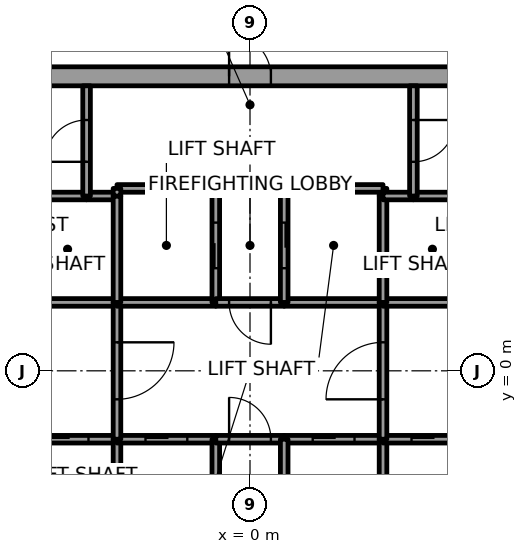
"""IFC4 building model, lengths in metres.
Left out: names, types, materials, properties, quantities, classifications, styles, units other than length and angle.
Written with IfcOpenShell. Run it as: python <this file> out.ifc"""

import sys

from ifc_helpers import new_model, si_unit, direction, frame, frame_2d, origin, place, context, subcontext, project, spatial, rectangle, extrude, element, fill, save


model = new_model("IFC4")
c1 = context("Model", 3, precision=1e-05, world=origin(), true_north=direction((0.0, 1.0)))
c2 = subcontext(c1, "Body", "Model", "MODEL_VIEW")
j1 = project(units=[si_unit("LENGTHUNIT", "METRE"), si_unit("PLANEANGLEUNIT", "RADIAN")], contexts=[c1])
p1 = place(None, origin())
s1 = spatial("IfcSite", under=j1, at=p1, CompositionType="ELEMENT")
p2 = place(p1, origin())
s2 = spatial("IfcBuilding", under=s1, at=p2, CompositionType="ELEMENT")
p3 = place(p2, frame((0.0, 0.0, 169.8)))
s3 = spatial("IfcBuildingStorey", under=s2, at=p3, CompositionType="ELEMENT", Elevation=169.8)
p4 = place(p3, frame((-11.0, 7.75, 0.0), z_axis=(0.0, 0.0, 1.0), x_axis=(1.0, 0.0, 0.0)))
e1 = element("IfcWall", 1, at=p4, inside=s3, PredefinedType="SHEAR", context=c2, shape_type="SweptSolid", body=[
    extrude(rectangle(XDim=22.0, YDim=0.5, at=frame_2d((11.0, 0.0))), origin(), (0.0, 0.0, 1.0), 4.0),
])
p5 = place(p4, frame((10.45, 0.0, 0.0)))
e2 = element("IfcOpeningElement", 2, at=p5, cuts=e1, PredefinedType="OPENING", context=c2, shape_type="SweptSolid", body=[
    extrude(rectangle(XDim=1.1, YDim=2.1, at=frame_2d((0.55, 1.05))), frame((0.0, 0.25, 0.0), z_axis=(0.0, -1.0, 0.0), x_axis=(1.0, 0.0, 0.0)), (0.0, 0.0, 1.0), 0.5),
])
p6 = place(p3, frame((-6.1, -1.8, 0.0), z_axis=(0.0, 0.0, 1.0), x_axis=(1.0, 0.0, 0.0)))
e3 = element("IfcWall", 3, at=p6, inside=s3, PredefinedType="SOLIDWALL", context=c2, shape_type="SweptSolid", body=[
    extrude(rectangle(XDim=2.6, YDim=0.2, at=frame_2d((1.3, 0.0))), origin(), (0.0, 0.0, 1.0), 3.85),
])
p7 = place(p6, frame((0.75, 0.0, 0.0)))
e4 = element("IfcOpeningElement", 4, at=p7, cuts=e3, PredefinedType="OPENING", context=c2, shape_type="SweptSolid", body=[
    extrude(rectangle(XDim=1.1, YDim=2.1, at=frame_2d((0.55, 1.05))), frame((0.0, 0.1, 0.0), z_axis=(0.0, -1.0, 0.0), x_axis=(1.0, 0.0, 0.0)), (0.0, 0.0, 1.0), 0.2),
])
p8 = place(p3, frame((-3.5, 1.8, 0.0), z_axis=(0.0, 0.0, 1.0), x_axis=(-1.0, 0.0, 0.0)))
e5 = element("IfcWall", 5, at=p8, inside=s3, PredefinedType="SOLIDWALL", context=c2, shape_type="SweptSolid", body=[
    extrude(rectangle(XDim=2.6, YDim=0.2, at=frame_2d((1.3, 0.0))), origin(), (0.0, 0.0, 1.0), 3.85),
])
p9 = place(p3, frame((-4.3, 4.6, 0.0), z_axis=(0.0, 0.0, 1.0), x_axis=(-1.0, 0.0, 0.0)))
e6 = element("IfcWall", 6, at=p9, inside=s3, PredefinedType="SOLIDWALL", context=c2, shape_type="SweptSolid", body=[
    extrude(rectangle(XDim=1.8, YDim=0.2, at=frame_2d((0.9, 0.0))), origin(), (0.0, 0.0, 1.0), 3.85),
])
p10 = place(p3, frame((-3.5, 4.6, 0.0), z_axis=(0.0, 0.0, 1.0), x_axis=(-1.0, 0.0, 0.0)))
e7 = element("IfcWall", 7, at=p10, inside=s3, PredefinedType="SOLIDWALL", context=c2, shape_type="SweptSolid", body=[
    extrude(rectangle(XDim=0.8, YDim=0.2, at=frame_2d((0.4, 0.0))), origin(), (0.0, 0.0, 1.0), 3.85),
])
p11 = place(p3, frame((-4.3, 4.6, 0.0), z_axis=(0.0, 0.0, 1.0), x_axis=(0.0, 1.0, 0.0)))
e8 = element("IfcWall", 8, at=p11, inside=s3, PredefinedType="SOLIDWALL", context=c2, shape_type="SweptSolid", body=[
    extrude(rectangle(XDim=2.9, YDim=0.2, at=frame_2d((1.45, 0.0))), origin(), (0.0, 0.0, 1.0), 3.85),
])
p12 = place(p11, frame((0.9, 0.0, 0.0)))
e9 = element("IfcOpeningElement", 9, at=p12, cuts=e8, PredefinedType="OPENING", context=c2, shape_type="SweptSolid", body=[
    extrude(rectangle(XDim=1.1, YDim=2.1, at=frame_2d((0.55, 1.05))), frame((0.0, 0.1, 0.0), z_axis=(0.0, -1.0, 0.0), x_axis=(1.0, 0.0, 0.0)), (0.0, 0.0, 1.0), 0.2),
])
p13 = place(p3, frame((-3.5, -4.6, 0.0), z_axis=(0.0, 0.0, 1.0), x_axis=(0.0, 1.0, 0.0)))
e10 = element("IfcWall", 10, at=p13, inside=s3, PredefinedType="SOLIDWALL", context=c2, shape_type="SweptSolid", body=[
    extrude(rectangle(XDim=2.8, YDim=0.2, at=frame_2d((1.4, 0.0))), origin(), (0.0, 0.0, 1.0), 3.85),
])
p14 = place(p3, frame((-3.5, -1.8, 0.0), z_axis=(0.0, 0.0, 1.0), x_axis=(1.0, 0.0, 0.0)))
e11 = element("IfcWall", 11, at=p14, inside=s3, PredefinedType="SOLIDWALL", context=c2, shape_type="SweptSolid", body=[
    extrude(rectangle(XDim=2.6, YDim=0.2, at=frame_2d((1.3, 0.0))), origin(), (0.0, 0.0, 1.0), 3.85),
])
p15 = place(p14, frame((0.75, 0.0, 0.0)))
e12 = element("IfcOpeningElement", 12, at=p15, cuts=e11, PredefinedType="OPENING", context=c2, shape_type="SweptSolid", body=[
    extrude(rectangle(XDim=1.1, YDim=2.1, at=frame_2d((0.55, 1.05))), frame((0.0, 0.1, 0.0), z_axis=(0.0, -1.0, 0.0), x_axis=(1.0, 0.0, 0.0)), (0.0, 0.0, 1.0), 0.2),
])
p16 = place(p3, frame((-3.5, 1.8, 0.0), z_axis=(0.0, 0.0, 1.0), x_axis=(0.0, -1.0, 0.0)))
e13 = element("IfcWall", 13, at=p16, inside=s3, PredefinedType="SOLIDWALL", context=c2, shape_type="SweptSolid", body=[
    extrude(rectangle(XDim=3.6, YDim=0.2, at=frame_2d((1.8, 0.0))), origin(), (0.0, 0.0, 1.0), 3.85),
])
p17 = place(p16, frame((1.05, 0.0, 0.0)))
e14 = element("IfcOpeningElement", 14, at=p17, cuts=e13, PredefinedType="OPENING", context=c2, shape_type="SweptSolid", body=[
    extrude(rectangle(XDim=1.5, YDim=2.1, at=frame_2d((0.75, 1.05))), frame((0.0, 0.1, 0.0), z_axis=(0.0, -1.0, 0.0), x_axis=(1.0, 0.0, 0.0)), (0.0, 0.0, 1.0), 0.2),
])
p18 = place(p3, frame((-0.9, 1.8, 0.0), z_axis=(0.0, 0.0, 1.0), x_axis=(-1.0, 0.0, 0.0)))
e15 = element("IfcWall", 15, at=p18, inside=s3, PredefinedType="SOLIDWALL", context=c2, shape_type="SweptSolid", body=[
    extrude(rectangle(XDim=2.6, YDim=0.2, at=frame_2d((1.3, 0.0))), origin(), (0.0, 0.0, 1.0), 3.85),
])
p19 = place(p3, frame((-3.5, 4.6, 0.0), z_axis=(0.0, 0.0, 1.0), x_axis=(0.0, -1.0, 0.0)))
e16 = element("IfcWall", 16, at=p19, inside=s3, PredefinedType="SOLIDWALL", context=c2, shape_type="SweptSolid", body=[
    extrude(rectangle(XDim=2.8, YDim=0.2, at=frame_2d((1.4, 0.0))), origin(), (0.0, 0.0, 1.0), 3.85),
])
p20 = place(p3, frame((-0.9, 1.8, 0.0), z_axis=(0.0, 0.0, 1.0), x_axis=(0.0, 1.0, 0.0)))
e17 = element("IfcWall", 17, at=p20, inside=s3, PredefinedType="SOLIDWALL", context=c2, shape_type="SweptSolid", body=[
    extrude(rectangle(XDim=3.0, YDim=0.2, at=frame_2d((1.5, 0.0))), origin(), (0.0, 0.0, 1.0), 3.85),
])
p21 = place(p20, frame((0.9, 0.0, 0.0)))
e18 = element("IfcOpeningElement", 18, at=p21, cuts=e17, PredefinedType="OPENING", context=c2, shape_type="SweptSolid", body=[
    extrude(rectangle(XDim=1.2, YDim=2.1, at=frame_2d((0.6, 1.05))), frame((0.0, 0.1, 0.0), z_axis=(0.0, -1.0, 0.0), x_axis=(1.0, 0.0, 0.0)), (0.0, 0.0, 1.0), 0.2),
])
p22 = place(p3, frame((-0.9, 4.8, 0.0), z_axis=(0.0, 0.0, 1.0), x_axis=(-1.0, 0.0, 0.0)))
e19 = element("IfcWall", 19, at=p22, inside=s3, PredefinedType="SOLIDWALL", context=c2, shape_type="SweptSolid", body=[
    extrude(rectangle(XDim=2.6, YDim=0.2, at=frame_2d((1.3, 0.0))), origin(), (0.0, 0.0, 1.0), 3.85),
])
p23 = place(p3, frame((-3.5, 4.8, 0.0), z_axis=(0.0, 0.0, 1.0), x_axis=(0.0, -1.0, 0.0)))
e20 = element("IfcWall", 20, at=p23, inside=s3, PredefinedType="SOLIDWALL", context=c2, shape_type="SweptSolid", body=[
    extrude(rectangle(XDim=0.2, YDim=0.2, at=frame_2d((0.1, 0.0))), origin(), (0.0, 0.0, 1.0), 3.85),
])
p24 = place(p3, frame((-0.9, -4.6, 0.0), z_axis=(0.0, 0.0, 1.0), x_axis=(0.0, 1.0, 0.0)))
e21 = element("IfcWall", 21, at=p24, inside=s3, PredefinedType="SOLIDWALL", context=c2, shape_type="SweptSolid", body=[
    extrude(rectangle(XDim=2.8, YDim=0.2, at=frame_2d((1.4, 0.0))), origin(), (0.0, 0.0, 1.0), 3.85),
])
p25 = place(p3, frame((-0.9, -1.8, 0.0), z_axis=(0.0, 0.0, 1.0), x_axis=(1.0, 0.0, 0.0)))
e22 = element("IfcWall", 22, at=p25, inside=s3, PredefinedType="SOLIDWALL", context=c2, shape_type="SweptSolid", body=[
    extrude(rectangle(XDim=1.8, YDim=0.2, at=frame_2d((0.9, 0.0))), origin(), (0.0, 0.0, 1.0), 3.85),
])
p26 = place(p25, frame((0.35, 0.0, 0.0)))
e23 = element("IfcOpeningElement", 23, at=p26, cuts=e22, PredefinedType="OPENING", context=c2, shape_type="SweptSolid", body=[
    extrude(rectangle(XDim=1.1, YDim=2.1, at=frame_2d((0.55, 1.05))), frame((0.0, 0.1, 0.0), z_axis=(0.0, -1.0, 0.0), x_axis=(1.0, 0.0, 0.0)), (0.0, 0.0, 1.0), 0.2),
])
p27 = place(p3, frame((0.9, 1.8, 0.0), z_axis=(0.0, 0.0, 1.0), x_axis=(-1.0, 0.0, 0.0)))
e24 = element("IfcWall", 24, at=p27, inside=s3, PredefinedType="SOLIDWALL", context=c2, shape_type="SweptSolid", body=[
    extrude(rectangle(XDim=1.8, YDim=0.2, at=frame_2d((0.9, 0.0))), origin(), (0.0, 0.0, 1.0), 3.85),
])
p28 = place(p27, frame((0.35, 0.0, 0.0)))
e25 = element("IfcOpeningElement", 25, at=p28, cuts=e24, PredefinedType="OPENING", context=c2, shape_type="SweptSolid", body=[
    extrude(rectangle(XDim=1.1, YDim=2.1, at=frame_2d((0.55, 1.05))), frame((0.0, 0.1, 0.0), z_axis=(0.0, -1.0, 0.0), x_axis=(1.0, 0.0, 0.0)), (0.0, 0.0, 1.0), 0.2),
])
p29 = place(p3, frame((0.9, -1.8, 0.0), z_axis=(0.0, 0.0, 1.0), x_axis=(1.0, 0.0, 0.0)))
e26 = element("IfcWall", 26, at=p29, inside=s3, PredefinedType="SOLIDWALL", context=c2, shape_type="SweptSolid", body=[
    extrude(rectangle(XDim=2.6, YDim=0.2, at=frame_2d((1.3, 0.0))), origin(), (0.0, 0.0, 1.0), 3.85),
])
p30 = place(p29, frame((0.75, 0.0, 0.0)))
e27 = element("IfcOpeningElement", 27, at=p30, cuts=e26, PredefinedType="OPENING", context=c2, shape_type="SweptSolid", body=[
    extrude(rectangle(XDim=1.1, YDim=2.1, at=frame_2d((0.55, 1.05))), frame((0.0, 0.1, 0.0), z_axis=(0.0, -1.0, 0.0), x_axis=(1.0, 0.0, 0.0)), (0.0, 0.0, 1.0), 0.2),
])
p31 = place(p3, frame((0.9, -1.8, 0.0), z_axis=(0.0, 0.0, 1.0), x_axis=(0.0, -1.0, 0.0)))
e28 = element("IfcWall", 28, at=p31, inside=s3, PredefinedType="SOLIDWALL", context=c2, shape_type="SweptSolid", body=[
    extrude(rectangle(XDim=2.8, YDim=0.2, at=frame_2d((1.4, 0.0))), origin(), (0.0, 0.0, 1.0), 3.85),
])
p32 = place(p3, frame((3.5, 1.8, 0.0), z_axis=(0.0, 0.0, 1.0), x_axis=(-1.0, 0.0, 0.0)))
e29 = element("IfcWall", 29, at=p32, inside=s3, PredefinedType="SOLIDWALL", context=c2, shape_type="SweptSolid", body=[
    extrude(rectangle(XDim=2.6, YDim=0.2, at=frame_2d((1.3, 0.0))), origin(), (0.0, 0.0, 1.0), 3.85),
])
p33 = place(p3, frame((3.5, 4.6, 0.0), z_axis=(0.0, 0.0, 1.0), x_axis=(0.0, 1.0, 0.0)))
e30 = element("IfcWall", 30, at=p33, inside=s3, PredefinedType="SOLIDWALL", context=c2, shape_type="SweptSolid", body=[
    extrude(rectangle(XDim=0.2, YDim=0.2, at=frame_2d((0.1, 0.0))), origin(), (0.0, 0.0, 1.0), 3.85),
])
p34 = place(p3, frame((3.5, 4.8, 0.0), z_axis=(0.0, 0.0, 1.0), x_axis=(-1.0, 0.0, 0.0)))
e31 = element("IfcWall", 31, at=p34, inside=s3, PredefinedType="SOLIDWALL", context=c2, shape_type="SweptSolid", body=[
    extrude(rectangle(XDim=2.6, YDim=0.2, at=frame_2d((1.3, 0.0))), origin(), (0.0, 0.0, 1.0), 3.85),
])
p35 = place(p3, frame((0.9, 4.8, 0.0), z_axis=(0.0, 0.0, 1.0), x_axis=(0.0, -1.0, 0.0)))
e32 = element("IfcWall", 32, at=p35, inside=s3, PredefinedType="SOLIDWALL", context=c2, shape_type="SweptSolid", body=[
    extrude(rectangle(XDim=3.0, YDim=0.2, at=frame_2d((1.5, 0.0))), origin(), (0.0, 0.0, 1.0), 3.85),
])
p36 = place(p35, frame((0.9, 0.0, 0.0)))
e33 = element("IfcOpeningElement", 33, at=p36, cuts=e32, PredefinedType="OPENING", context=c2, shape_type="SweptSolid", body=[
    extrude(rectangle(XDim=1.2, YDim=2.1, at=frame_2d((0.6, 1.05))), frame((0.0, 0.1, 0.0), z_axis=(0.0, -1.0, 0.0), x_axis=(1.0, 0.0, 0.0)), (0.0, 0.0, 1.0), 0.2),
])
p37 = place(p3, frame((3.5, -4.6, 0.0), z_axis=(0.0, 0.0, 1.0), x_axis=(0.0, 1.0, 0.0)))
e34 = element("IfcWall", 34, at=p37, inside=s3, PredefinedType="SOLIDWALL", context=c2, shape_type="SweptSolid", body=[
    extrude(rectangle(XDim=2.8, YDim=0.2, at=frame_2d((1.4, 0.0))), origin(), (0.0, 0.0, 1.0), 3.85),
])
p38 = place(p3, frame((3.5, -1.8, 0.0), z_axis=(0.0, 0.0, 1.0), x_axis=(1.0, 0.0, 0.0)))
e35 = element("IfcWall", 35, at=p38, inside=s3, PredefinedType="SOLIDWALL", context=c2, shape_type="SweptSolid", body=[
    extrude(rectangle(XDim=2.6, YDim=0.2, at=frame_2d((1.3, 0.0))), origin(), (0.0, 0.0, 1.0), 3.85),
])
p39 = place(p38, frame((0.75, 0.0, 0.0)))
e36 = element("IfcOpeningElement", 36, at=p39, cuts=e35, PredefinedType="OPENING", context=c2, shape_type="SweptSolid", body=[
    extrude(rectangle(XDim=1.1, YDim=2.1, at=frame_2d((0.55, 1.05))), frame((0.0, 0.1, 0.0), z_axis=(0.0, -1.0, 0.0), x_axis=(1.0, 0.0, 0.0)), (0.0, 0.0, 1.0), 0.2),
])
p40 = place(p3, frame((3.5, -1.8, 0.0), z_axis=(0.0, 0.0, 1.0), x_axis=(0.0, 1.0, 0.0)))
e37 = element("IfcWall", 37, at=p40, inside=s3, PredefinedType="SOLIDWALL", context=c2, shape_type="SweptSolid", body=[
    extrude(rectangle(XDim=3.6, YDim=0.2, at=frame_2d((1.8, 0.0))), origin(), (0.0, 0.0, 1.0), 3.85),
])
p41 = place(p40, frame((1.05, 0.0, 0.0)))
e38 = element("IfcOpeningElement", 38, at=p41, cuts=e37, PredefinedType="OPENING", context=c2, shape_type="SweptSolid", body=[
    extrude(rectangle(XDim=1.5, YDim=2.1, at=frame_2d((0.75, 1.05))), frame((0.0, 0.1, 0.0), z_axis=(0.0, -1.0, 0.0), x_axis=(1.0, 0.0, 0.0)), (0.0, 0.0, 1.0), 0.2),
])
p42 = place(p3, frame((6.1, 1.8, 0.0), z_axis=(0.0, 0.0, 1.0), x_axis=(-1.0, 0.0, 0.0)))
e39 = element("IfcWall", 39, at=p42, inside=s3, PredefinedType="SOLIDWALL", context=c2, shape_type="SweptSolid", body=[
    extrude(rectangle(XDim=2.6, YDim=0.2, at=frame_2d((1.3, 0.0))), origin(), (0.0, 0.0, 1.0), 3.85),
])
p43 = place(p3, frame((3.5, 1.8, 0.0), z_axis=(0.0, 0.0, 1.0), x_axis=(0.0, 1.0, 0.0)))
e40 = element("IfcWall", 40, at=p43, inside=s3, PredefinedType="SOLIDWALL", context=c2, shape_type="SweptSolid", body=[
    extrude(rectangle(XDim=2.8, YDim=0.2, at=frame_2d((1.4, 0.0))), origin(), (0.0, 0.0, 1.0), 3.85),
])
p44 = place(p3, frame((4.3, 4.6, 0.0), z_axis=(0.0, 0.0, 1.0), x_axis=(-1.0, 0.0, 0.0)))
e41 = element("IfcWall", 41, at=p44, inside=s3, PredefinedType="SOLIDWALL", context=c2, shape_type="SweptSolid", body=[
    extrude(rectangle(XDim=0.8, YDim=0.2, at=frame_2d((0.4, 0.0))), origin(), (0.0, 0.0, 1.0), 3.85),
])
p45 = place(p3, frame((6.1, 4.6, 0.0), z_axis=(0.0, 0.0, 1.0), x_axis=(-1.0, 0.0, 0.0)))
e42 = element("IfcWall", 42, at=p45, inside=s3, PredefinedType="SOLIDWALL", context=c2, shape_type="SweptSolid", body=[
    extrude(rectangle(XDim=1.8, YDim=0.2, at=frame_2d((0.9, 0.0))), origin(), (0.0, 0.0, 1.0), 3.85),
])
p46 = place(p3, frame((4.3, 7.5, 0.0), z_axis=(0.0, 0.0, 1.0), x_axis=(0.0, -1.0, 0.0)))
e43 = element("IfcWall", 43, at=p46, inside=s3, PredefinedType="SOLIDWALL", context=c2, shape_type="SweptSolid", body=[
    extrude(rectangle(XDim=2.9, YDim=0.2, at=frame_2d((1.45, 0.0))), origin(), (0.0, 0.0, 1.0), 3.85),
])
p47 = place(p46, frame((0.9, 0.0, 0.0)))
e44 = element("IfcOpeningElement", 44, at=p47, cuts=e43, PredefinedType="OPENING", context=c2, shape_type="SweptSolid", body=[
    extrude(rectangle(XDim=1.1, YDim=2.1, at=frame_2d((0.55, 1.05))), frame((0.0, 0.1, 0.0), z_axis=(0.0, -1.0, 0.0), x_axis=(1.0, 0.0, 0.0)), (0.0, 0.0, 1.0), 0.2),
])
p48 = place(p7, origin())
e45 = element("IfcDoor", 45, at=p48, inside=s3, OperationType="SLIDING_TO_LEFT", PredefinedType="DOOR", context=c2, shape_type="SweptSolid", body=[
    extrude(rectangle(XDim=1.1, YDim=2.1, at=frame_2d((0.55, 1.05))), frame((0.0, 0.025, 0.0), z_axis=(0.0, -1.0, 0.0), x_axis=(1.0, 0.0, 0.0)), (0.0, 0.0, 1.0), 0.05),
])
fill(e4, e45)
p49 = place(p15, origin())
e46 = element("IfcDoor", 46, at=p49, inside=s3, OperationType="SLIDING_TO_RIGHT", PredefinedType="DOOR", context=c2, shape_type="SweptSolid", body=[
    extrude(rectangle(XDim=1.1, YDim=2.1, at=frame_2d((0.55, 1.05))), frame((0.0, 0.025, 0.0), z_axis=(0.0, -1.0, 0.0), x_axis=(1.0, 0.0, 0.0)), (0.0, 0.0, 1.0), 0.05),
])
fill(e12, e46)
p50 = place(p30, origin())
e47 = element("IfcDoor", 47, at=p50, inside=s3, OperationType="SLIDING_TO_LEFT", PredefinedType="DOOR", context=c2, shape_type="SweptSolid", body=[
    extrude(rectangle(XDim=1.1, YDim=2.1, at=frame_2d((0.55, 1.05))), frame((0.0, 0.025, 0.0), z_axis=(0.0, -1.0, 0.0), x_axis=(1.0, 0.0, 0.0)), (0.0, 0.0, 1.0), 0.05),
])
fill(e27, e47)
p51 = place(p39, origin())
e48 = element("IfcDoor", 48, at=p51, inside=s3, OperationType="SLIDING_TO_LEFT", PredefinedType="DOOR", context=c2, shape_type="SweptSolid", body=[
    extrude(rectangle(XDim=1.1, YDim=2.1, at=frame_2d((0.55, 1.05))), frame((0.0, 0.025, 0.0), z_axis=(0.0, -1.0, 0.0), x_axis=(1.0, 0.0, 0.0)), (0.0, 0.0, 1.0), 0.05),
])
fill(e36, e48)
p52 = place(p21, origin())
e49 = element("IfcDoor", 49, at=p52, inside=s3, OperationType="SLIDING_TO_LEFT", PredefinedType="DOOR", context=c2, shape_type="SweptSolid", body=[
    extrude(rectangle(XDim=1.2, YDim=2.1, at=frame_2d((0.6, 1.05))), frame((0.0, 0.025, 0.0), z_axis=(0.0, -1.0, 0.0), x_axis=(1.0, 0.0, 0.0)), (0.0, 0.0, 1.0), 0.05),
])
fill(e18, e49)
p53 = place(p36, origin())
e50 = element("IfcDoor", 50, at=p53, inside=s3, OperationType="SLIDING_TO_RIGHT", PredefinedType="DOOR", context=c2, shape_type="SweptSolid", body=[
    extrude(rectangle(XDim=1.2, YDim=2.1, at=frame_2d((0.6, 1.05))), frame((0.0, 0.025, 0.0), z_axis=(0.0, -1.0, 0.0), x_axis=(1.0, 0.0, 0.0)), (0.0, 0.0, 1.0), 0.05),
])
fill(e33, e50)
p54 = place(p17, origin())
e51 = element("IfcDoor", 51, at=p54, inside=s3, OperationType="DOUBLE_DOOR_SINGLE_SWING", PredefinedType="DOOR", context=c2, shape_type="SweptSolid", body=[
    extrude(rectangle(XDim=1.5, YDim=2.1, at=frame_2d((0.75, 1.05))), frame((0.0, 0.025, 0.0), z_axis=(0.0, -1.0, 0.0), x_axis=(1.0, 0.0, 0.0)), (0.0, 0.0, 1.0), 0.05),
])
fill(e14, e51)
p55 = place(p41, origin())
e52 = element("IfcDoor", 52, at=p55, inside=s3, OperationType="DOUBLE_DOOR_SINGLE_SWING", PredefinedType="DOOR", context=c2, shape_type="SweptSolid", body=[
    extrude(rectangle(XDim=1.5, YDim=2.1, at=frame_2d((0.75, 1.05))), frame((0.0, 0.025, 0.0), z_axis=(0.0, -1.0, 0.0), x_axis=(1.0, 0.0, 0.0)), (0.0, 0.0, 1.0), 0.05),
])
fill(e38, e52)
p56 = place(p28, origin())
e53 = element("IfcDoor", 53, at=p56, inside=s3, OperationType="SINGLE_SWING_LEFT", PredefinedType="DOOR", context=c2, shape_type="SweptSolid", body=[
    extrude(rectangle(XDim=1.1, YDim=2.1, at=frame_2d((0.55, 1.05))), frame((0.0, 0.025, 0.0), z_axis=(0.0, -1.0, 0.0), x_axis=(1.0, 0.0, 0.0)), (0.0, 0.0, 1.0), 0.05),
])
fill(e25, e53)
p57 = place(p26, origin())
e54 = element("IfcDoor", 54, at=p57, inside=s3, OperationType="SINGLE_SWING_LEFT", PredefinedType="DOOR", context=c2, shape_type="SweptSolid", body=[
    extrude(rectangle(XDim=1.1, YDim=2.1, at=frame_2d((0.55, 1.05))), frame((0.0, 0.025, 0.0), z_axis=(0.0, -1.0, 0.0), x_axis=(1.0, 0.0, 0.0)), (0.0, 0.0, 1.0), 0.05),
])
fill(e23, e54)
p58 = place(p12, origin())
e55 = element("IfcDoor", 55, at=p58, inside=s3, OperationType="SINGLE_SWING_LEFT", PredefinedType="DOOR", context=c2, shape_type="SweptSolid", body=[
    extrude(rectangle(XDim=1.1, YDim=2.1, at=frame_2d((0.55, 1.05))), frame((0.0, 0.025, 0.0), z_axis=(0.0, -1.0, 0.0), x_axis=(1.0, 0.0, 0.0)), (0.0, 0.0, 1.0), 0.05),
])
fill(e9, e55)
p59 = place(p47, origin())
e56 = element("IfcDoor", 56, at=p59, inside=s3, OperationType="SINGLE_SWING_RIGHT", PredefinedType="DOOR", context=c2, shape_type="SweptSolid", body=[
    extrude(rectangle(XDim=1.1, YDim=2.1, at=frame_2d((0.55, 1.05))), frame((0.0, 0.025, 0.0), z_axis=(0.0, -1.0, 0.0), x_axis=(1.0, 0.0, 0.0)), (0.0, 0.0, 1.0), 0.05),
])
fill(e44, e56)
p60 = place(p5, origin())
e57 = element("IfcDoor", 57, at=p60, inside=s3, OperationType="SINGLE_SWING_LEFT", PredefinedType="DOOR", context=c2, shape_type="SweptSolid", body=[
    extrude(rectangle(XDim=1.1, YDim=2.1, at=frame_2d((0.55, 1.05))), frame((0.0, 0.025, 0.0), z_axis=(0.0, -1.0, 0.0), x_axis=(1.0, 0.0, 0.0)), (0.0, 0.0, 1.0), 0.05),
])
fill(e2, e57)
save(model, sys.argv[1])
